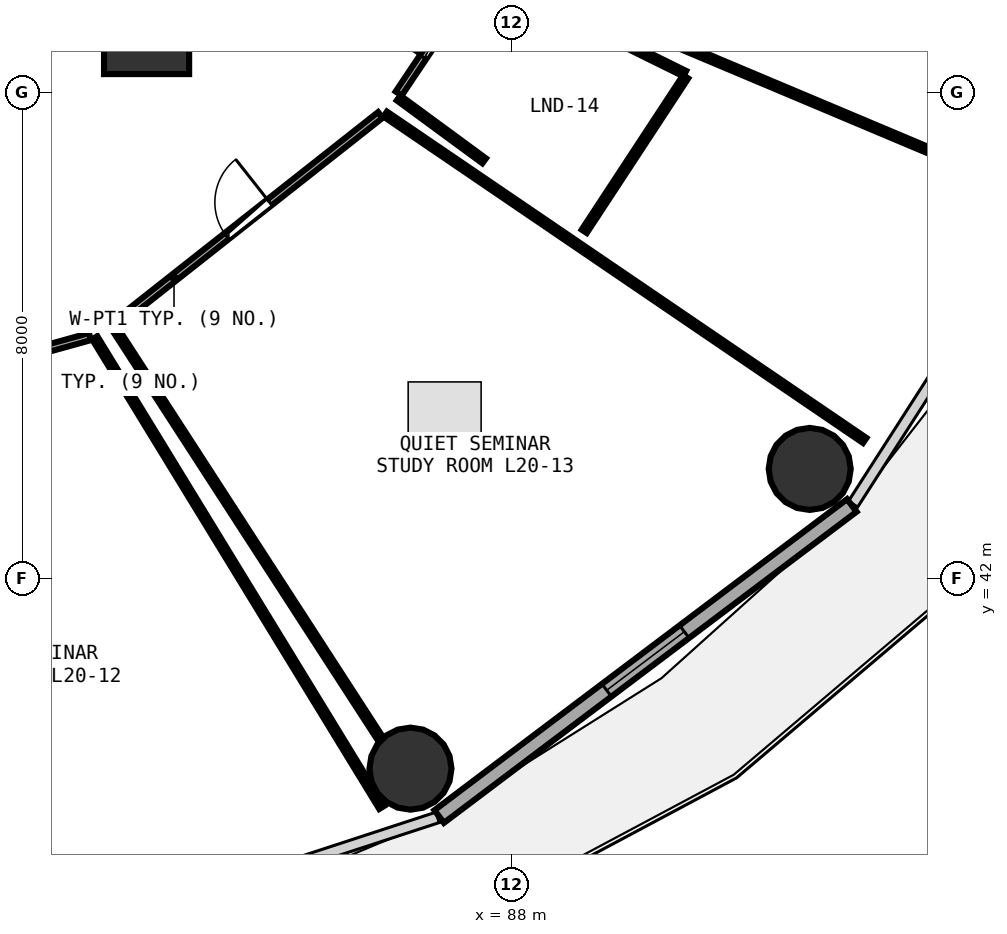
"""IFC4 building model, lengths in metres.
Left out: names, types, materials, properties, quantities, classifications, styles, units other than length and angle.
Written with IfcOpenShell. Run it as: python <this file> out.ifc"""

import sys

from ifc_helpers import new_model, si_unit, direction, frame, frame_2d, origin, origin_2d, place, context, subcontext, project, spatial, rectangle, circle, extrude, element, fill, save


model = new_model("IFC4")
c1 = context("Model", 3, precision=1e-05, world=origin(), true_north=direction((0.0, 1.0)))
c2 = subcontext(c1, "Body", "Model", "MODEL_VIEW")
j1 = project(units=[si_unit("LENGTHUNIT", "METRE"), si_unit("PLANEANGLEUNIT", "RADIAN")], contexts=[c1])
p1 = place(None, origin())
s1 = spatial("IfcSite", under=j1, at=p1, CompositionType="ELEMENT")
p2 = place(p1, origin())
s2 = spatial("IfcBuilding", under=s1, at=p2, CompositionType="ELEMENT")
p3 = place(p2, frame((0.0, 0.0, 80.1)))
s3 = spatial("IfcBuildingStorey", under=s2, at=p3, CompositionType="ELEMENT", Elevation=80.1)
p4 = place(p3, frame((82.0, 51.0, 0.0), z_axis=(0.0, 0.0, 1.0), x_axis=(1.0, 0.0, 0.0)))
e1 = element("IfcColumn", 1, at=p4, inside=s3, PredefinedType="PILASTER", context=c2, shape_type="SweptSolid", body=[
    extrude(rectangle(XDim=1.4, YDim=1.4, at=origin_2d()), origin(), (0.0, 0.0, 1.0), 3.75),
])
for number, where, z_axis, x_axis in (
    (2, (86.34, 38.878, 0.0), (0.0, 0.0, 1.0), (1.0, 0.0, 0.0)),
    (3, (92.906, 43.807, 0.0), (0.0, 0.0, 1.0), (1.0, 0.0, 0.0)),
):
    element("IfcColumn", number, at=place(p3, frame(where, z_axis=z_axis, x_axis=x_axis)), inside=s3, PredefinedType="COLUMN", context=c2, shape_type="SweptSolid", body=[
        extrude(circle(Radius=0.675, at=origin_2d()), origin(), (0.0, 0.0, 1.0), 3.75),
    ])
p5 = place(p3, frame((86.812, 38.09, 0.0), z_axis=(0.0, 0.0, 1.0), x_axis=(0.798501507879, 0.601992808857, 0.0)))
e4 = element("IfcWall", 4, at=p5, inside=s3, PredefinedType="SOLIDWALL", context=c2, shape_type="SweptSolid", body=[
    extrude(rectangle(XDim=8.499, YDim=0.26, at=frame_2d((4.25, 0.0))), origin(), (0.0, 0.0, 1.0), 3.475),
])
p6 = place(p5, frame((3.45, 0.0, 0.85)))
e5 = element("IfcOpeningElement", 5, at=p6, cuts=e4, PredefinedType="OPENING", context=c2, shape_type="SweptSolid", body=[
    extrude(rectangle(XDim=1.6, YDim=1.45, at=frame_2d((0.8, 0.725))), frame((0.0, 0.14, 0.0), z_axis=(0.0, -1.0, 0.0), x_axis=(1.0, 0.0, 0.0)), (0.0, 0.0, 1.0), 0.28),
])
p7 = place(p3, frame((75.551, 44.453, 0.0), z_axis=(0.0, 0.0, 1.0), x_axis=(0.963633279283, 0.267228185374, 0.0)))
e6 = element("IfcWall", 6, at=p7, inside=s3, PredefinedType="PARTITIONING", context=c2, shape_type="SweptSolid", body=[
    extrude(rectangle(XDim=5.726, YDim=0.12, at=frame_2d((2.863, 0.0))), origin(), (0.0, 0.0, 1.0), 2.925),
])
p8 = place(p7, frame((2.413, 0.0, 0.0)))
e7 = element("IfcOpeningElement", 7, at=p8, cuts=e6, PredefinedType="OPENING", context=c2, shape_type="SweptSolid", body=[
    extrude(rectangle(XDim=0.9, YDim=2.08, at=frame_2d((0.45, 1.04))), frame((0.0, 0.07, 0.0), z_axis=(0.0, -1.0, 0.0), x_axis=(1.0, 0.0, 0.0)), (0.0, 0.0, 1.0), 0.14),
])
p9 = place(p3, frame((81.494, 46.198, 0.0), z_axis=(0.0, 0.0, 1.0), x_axis=(0.785315722545, 0.619095482074, 0.0)))
e8 = element("IfcWall", 8, at=p9, inside=s3, PredefinedType="PARTITIONING", context=c2, shape_type="SweptSolid", body=[
    extrude(rectangle(XDim=5.54, YDim=0.12, at=frame_2d((2.77, 0.0))), origin(), (0.0, 0.0, 1.0), 2.925),
])
p10 = place(p9, frame((2.32, 0.0, 0.0)))
e9 = element("IfcOpeningElement", 9, at=p10, cuts=e8, PredefinedType="OPENING", context=c2, shape_type="SweptSolid", body=[
    extrude(rectangle(XDim=0.9, YDim=2.08, at=frame_2d((0.45, 1.04))), frame((0.0, 0.07, 0.0), z_axis=(0.0, -1.0, 0.0), x_axis=(1.0, 0.0, 0.0)), (0.0, 0.0, 1.0), 0.14),
])
p11 = place(p3, frame((86.146, 49.981, 0.0), z_axis=(0.0, 0.0, 1.0), x_axis=(0.556604342457, 0.83077771152, 0.0)))
e10 = element("IfcWall", 10, at=p11, inside=s3, PredefinedType="PARTITIONING", context=c2, shape_type="SweptSolid", body=[
    extrude(rectangle(XDim=2.336, YDim=0.12, at=frame_2d((1.168, 0.0))), origin(), (0.0, 0.0, 1.0), 2.925),
])
p12 = place(p11, frame((0.718, 0.0, 0.0)))
e11 = element("IfcOpeningElement", 11, at=p12, cuts=e10, PredefinedType="OPENING", context=c2, shape_type="SweptSolid", body=[
    extrude(rectangle(XDim=0.9, YDim=2.08, at=frame_2d((0.45, 1.04))), frame((0.0, 0.07, 0.0), z_axis=(0.0, -1.0, 0.0), x_axis=(1.0, 0.0, 0.0)), (0.0, 0.0, 1.0), 0.14),
])
p13 = place(p3, frame((81.147, 45.965, 0.0), z_axis=(0.0, 0.0, 1.0), x_axis=(0.521624536189, -0.853175153908, 0.0)))
e12 = element("IfcWall", 12, at=p13, inside=s3, PredefinedType="PARTITIONING", context=c2, shape_type="SweptSolid", body=[
    extrude(rectangle(XDim=9.053, YDim=0.1, at=frame_2d((4.526, 0.0))), origin(), (0.0, 0.0, 1.0), 2.975),
])
p14 = place(p3, frame((85.925, 49.643, 0.0), z_axis=(0.0, 0.0, 1.0), x_axis=(0.826688408753, -0.562659999319, 0.0)))
e13 = element("IfcWall", 13, at=p14, inside=s3, PredefinedType="PARTITIONING", context=c2, shape_type="SweptSolid", body=[
    extrude(rectangle(XDim=9.539, YDim=0.1, at=frame_2d((4.77, 0.0))), origin(), (0.0, 0.0, 1.0), 2.975),
])
p15 = place(p3, frame((85.844, 39.372, 0.0), z_axis=(0.0, 0.0, 1.0), x_axis=(-0.543590830013, 0.839350349691, 0.0)))
e14 = element("IfcWall", 14, at=p15, inside=s3, PredefinedType="PARTITIONING", context=c2, shape_type="SweptSolid", body=[
    extrude(rectangle(XDim=8.048, YDim=0.1, at=frame_2d((4.024, 0.0))), origin(), (0.0, 0.0, 1.0), 3.175),
])
p16 = place(p3, frame((87.516, 51.953, 0.0), z_axis=(0.0, 0.0, 1.0), x_axis=(0.896816300292, -0.442403123328, 0.0)))
e15 = element("IfcWall", 15, at=p16, inside=s3, PredefinedType="PARTITIONING", context=c2, shape_type="SweptSolid", body=[
    extrude(rectangle(XDim=3.72, YDim=0.1, at=frame_2d((1.86, 0.0))), origin(), (0.0, 0.0, 1.0), 2.925),
])
p17 = place(p3, frame((90.866, 50.257, 0.0), z_axis=(0.0, 0.0, 1.0), x_axis=(-0.548626626693, -0.836067476035, 0.0)))
e16 = element("IfcWall", 16, at=p17, inside=s3, PredefinedType="PARTITIONING", context=c2, shape_type="SweptSolid", body=[
    extrude(rectangle(XDim=3.041, YDim=0.1, at=frame_2d((1.521, 0.0))), origin(), (0.0, 0.0, 1.0), 3.175),
])
p18 = place(p3, frame((87.552, 48.874, 0.0), z_axis=(0.0, 0.0, 1.0), x_axis=(-0.805902241708, 0.592048627065, 0.0)))
e17 = element("IfcWall", 17, at=p18, inside=s3, PredefinedType="PARTITIONING", context=c2, shape_type="SweptSolid", body=[
    extrude(rectangle(XDim=1.746, YDim=0.1, at=frame_2d((0.873, 0.0))), origin(), (0.0, 0.0, 1.0), 3.235),
])
p19 = place(p3, frame((96.59, 48.319, 0.0), z_axis=(0.0, 0.0, 1.0), x_axis=(-0.92163364156, 0.388061117279, 0.0)))
e18 = element("IfcWall", 18, at=p19, inside=s3, PredefinedType="PARTITIONING", context=c2, shape_type="SweptSolid", body=[
    extrude(rectangle(XDim=7.953, YDim=0.1, at=frame_2d((3.977, 0.0))), origin(), (0.0, 0.0, 1.0), 2.925),
])
p20 = place(p6, origin())
e19 = element("IfcWindow", 19, at=p20, inside=s3, PartitioningType="SINGLE_PANEL", PredefinedType="WINDOW", context=c2, shape_type="SweptSolid", body=[
    extrude(rectangle(XDim=1.6, YDim=1.45, at=frame_2d((0.8, 0.725))), frame((0.0, 0.03, 0.0), z_axis=(0.0, -1.0, 0.0), x_axis=(1.0, 0.0, 0.0)), (0.0, 0.0, 1.0), 0.06),
])
fill(e5, e19)
p21 = place(p10, origin())
e20 = element("IfcDoor", 20, at=p21, inside=s3, OperationType="SINGLE_SWING_RIGHT", PredefinedType="DOOR", context=c2, shape_type="SweptSolid", body=[
    extrude(rectangle(XDim=0.9, YDim=2.08, at=frame_2d((0.45, 1.04))), frame((0.0, 0.025, 0.0), z_axis=(0.0, -1.0, 0.0), x_axis=(1.0, 0.0, 0.0)), (0.0, 0.0, 1.0), 0.05),
])
fill(e9, e20)
p22 = place(p12, origin())
e21 = element("IfcDoor", 21, at=p22, inside=s3, OperationType="SINGLE_SWING_LEFT", PredefinedType="DOOR", context=c2, shape_type="SweptSolid", body=[
    extrude(rectangle(XDim=0.9, YDim=2.08, at=frame_2d((0.45, 1.04))), frame((0.0, 0.025, 0.0), z_axis=(0.0, -1.0, 0.0), x_axis=(1.0, 0.0, 0.0)), (0.0, 0.0, 1.0), 0.05),
])
fill(e11, e21)
save(model, sys.argv[1])
